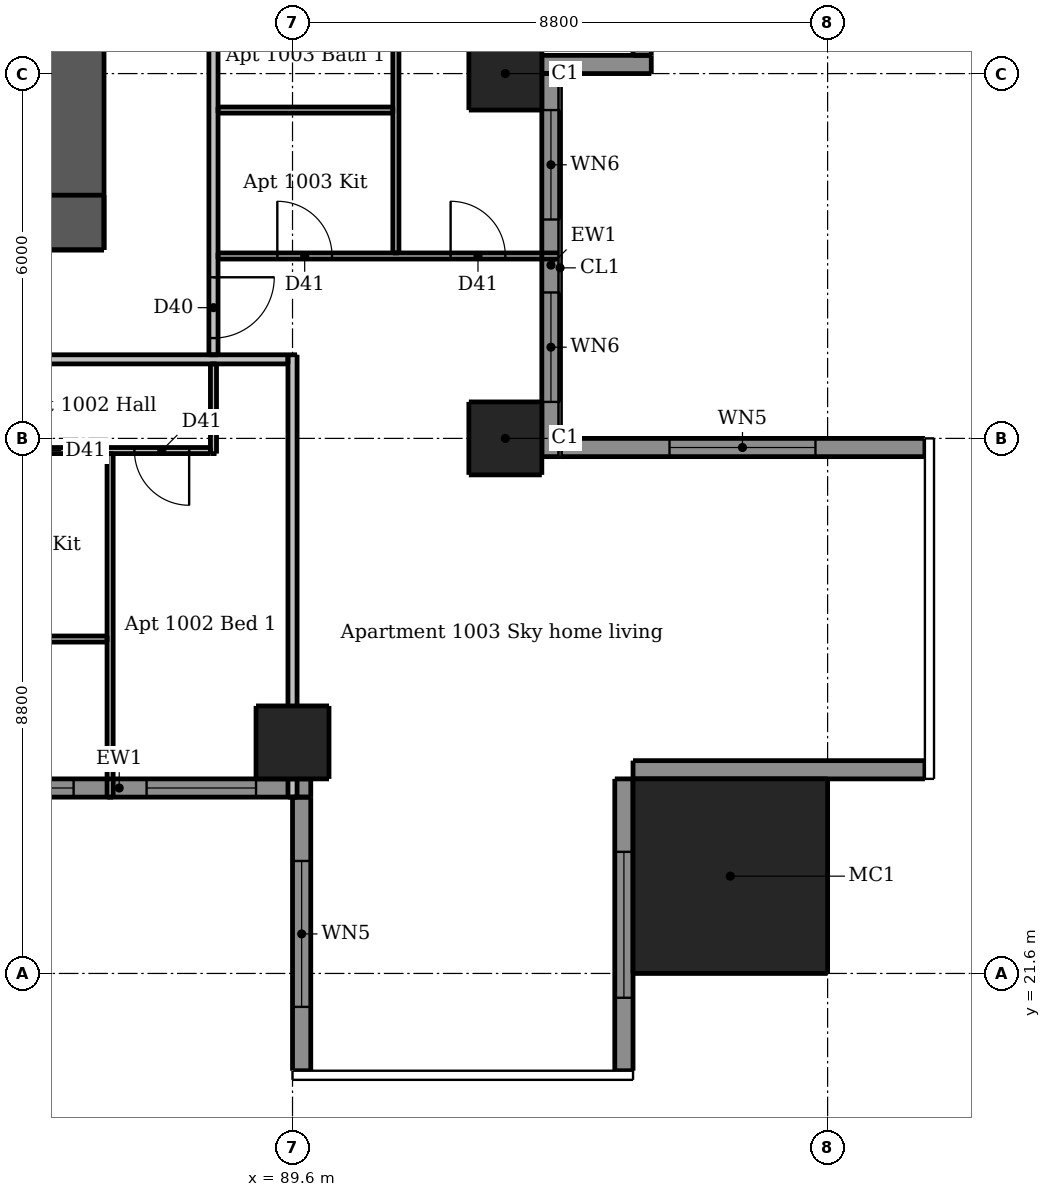
"""IFC4 building model, lengths in metres.
Left out: names, types, materials, properties, quantities, classifications, styles, units other than length and angle.
Written with IfcOpenShell. Run it as: python <this file> out.ifc"""

import sys

from ifc_helpers import new_model, si_unit, direction, frame, frame_2d, origin, origin_2d, place, context, subcontext, project, spatial, rectangle, extrude, element, fill, save


model = new_model("IFC4")
c1 = context("Model", 3, precision=1e-05, world=origin(), true_north=direction((0.0, 1.0)))
c2 = subcontext(c1, "Body", "Model", "MODEL_VIEW")
j1 = project(units=[si_unit("LENGTHUNIT", "METRE"), si_unit("PLANEANGLEUNIT", "RADIAN")], contexts=[c1])
p1 = place(None, origin())
s1 = spatial("IfcSite", under=j1, at=p1, CompositionType="ELEMENT")
p2 = place(p1, origin())
s2 = spatial("IfcBuilding", under=s1, at=p2, CompositionType="ELEMENT")
p3 = place(p2, frame((0.0, 0.0, 40.0)))
s3 = spatial("IfcBuildingStorey", under=s2, at=p3, CompositionType="ELEMENT", Elevation=40.0)
p4 = place(p3, frame((62.5, 33.95, 0.0), z_axis=(0.0, 0.0, 1.0), x_axis=(1.0, 0.0, 0.0)))
e1 = element("IfcWall", 1, at=p4, inside=s3, PredefinedType="SHEAR", context=c2, shape_type="SweptSolid", body=[
    extrude(rectangle(XDim=24.0, YDim=0.9, at=frame_2d((12.0, 0.0))), origin(), (0.0, 0.0, 1.0), 3.05),
])
p5 = place(p4, frame((2.05, 0.0, 0.0)))
e2 = element("IfcOpeningElement", 2, at=p5, cuts=e1, PredefinedType="OPENING", context=c2, shape_type="SweptSolid", body=[
    extrude(rectangle(XDim=1.1, YDim=2.1, at=frame_2d((0.55, 1.05))), frame((0.0, 0.46, 0.0), z_axis=(0.0, -1.0, 0.0), x_axis=(1.0, 0.0, 0.0)), (0.0, 0.0, 1.0), 0.92),
])
p6 = place(p4, frame((20.85, 0.0, 0.0)))
e3 = element("IfcOpeningElement", 3, at=p6, cuts=e1, PredefinedType="OPENING", context=c2, shape_type="SweptSolid", body=[
    extrude(rectangle(XDim=1.1, YDim=2.1, at=frame_2d((0.55, 1.05))), frame((0.0, 0.46, 0.0), z_axis=(0.0, -1.0, 0.0), x_axis=(1.0, 0.0, 0.0)), (0.0, 0.0, 1.0), 0.92),
])
p7 = place(p4, frame((8.0, 0.0, 0.0)))
e4 = element("IfcOpeningElement", 4, at=p7, cuts=e1, PredefinedType="OPENING", context=c2, shape_type="SweptSolid", body=[
    extrude(rectangle(XDim=1.1, YDim=2.1, at=frame_2d((0.55, 1.05))), frame((0.0, 0.46, 0.0), z_axis=(0.0, -1.0, 0.0), x_axis=(1.0, 0.0, 0.0)), (0.0, 0.0, 1.0), 0.92),
])
p8 = place(p4, frame((16.363, 0.0, 0.0)))
e5 = element("IfcOpeningElement", 5, at=p8, cuts=e1, PredefinedType="OPENING", context=c2, shape_type="SweptSolid", body=[
    extrude(rectangle(XDim=0.9, YDim=2.1, at=frame_2d((0.45, 1.05))), frame((0.0, 0.46, 0.0), z_axis=(0.0, -1.0, 0.0), x_axis=(1.0, 0.0, 0.0)), (0.0, 0.0, 1.0), 0.92),
])
p9 = place(p3, frame((86.05, 33.5, 0.0), z_axis=(0.0, 0.0, 1.0), x_axis=(0.0, 1.0, 0.0)))
e6 = element("IfcWall", 6, at=p9, inside=s3, PredefinedType="SHEAR", context=c2, shape_type="SweptSolid", body=[
    extrude(rectangle(XDim=24.0, YDim=0.9, at=frame_2d((12.0, 0.0))), origin(), (0.0, 0.0, 1.0), 3.05),
])
p10 = place(p9, frame((11.2, 0.0, 0.0)))
e7 = element("IfcOpeningElement", 7, at=p10, cuts=e6, PredefinedType="OPENING", context=c2, shape_type="SweptSolid", body=[
    extrude(rectangle(XDim=1.6, YDim=2.1, at=frame_2d((0.8, 1.05))), frame((0.0, 0.46, 0.0), z_axis=(0.0, -1.0, 0.0), x_axis=(1.0, 0.0, 0.0)), (0.0, 0.0, 1.0), 0.92),
])
for number, where, z_axis, x_axis in (
    (8, (89.6, 25.4, 0.0), (0.0, 0.0, 1.0), (1.0, 0.0, 0.0)),
    (9, (93.1, 30.4, 0.0), (0.0, 0.0, 1.0), (1.0, 0.0, 0.0)),
    (10, (93.1, 36.4, 0.0), (0.0, 0.0, 1.0), (1.0, 0.0, 0.0)),
):
    element("IfcColumn", number, at=place(p3, frame(where, z_axis=z_axis, x_axis=x_axis)), inside=s3, PredefinedType="COLUMN", context=c2, shape_type="SweptSolid", body=[
        extrude(rectangle(XDim=1.2, YDim=1.2, at=origin_2d()), origin(), (0.0, 0.0, 1.0), 3.05),
    ])
p11 = place(p3, frame((96.8, 23.2, 0.0), z_axis=(0.0, 0.0, 1.0), x_axis=(1.0, 0.0, 0.0)))
e11 = element("IfcColumn", 11, at=p11, inside=s3, PredefinedType="COLUMN", context=c2, shape_type="SweptSolid", body=[
    extrude(rectangle(XDim=3.2, YDim=3.2, at=origin_2d()), origin(), (0.0, 0.0, 1.0), 3.3),
])
p12 = place(p3, frame((89.75, 24.5, 0.0), z_axis=(0.0, 0.0, 1.0), x_axis=(0.0, -1.0, 0.0)))
e12 = element("IfcWall", 12, at=p12, inside=s3, PredefinedType="SOLIDWALL", context=c2, shape_type="SweptSolid", body=[
    extrude(rectangle(XDim=4.5, YDim=0.3, at=frame_2d((2.25, 0.0))), origin(), (0.0, 0.0, 1.0), 3.05),
])
p13 = place(p12, frame((1.05, 0.0, 0.15)))
e13 = element("IfcOpeningElement", 13, at=p13, cuts=e12, PredefinedType="OPENING", context=c2, shape_type="SweptSolid", body=[
    extrude(rectangle(XDim=2.4, YDim=2.1, at=frame_2d((1.2, 1.05))), frame((0.0, 0.16, 0.0), z_axis=(0.0, -1.0, 0.0), x_axis=(1.0, 0.0, 0.0)), (0.0, 0.0, 1.0), 0.32),
])
p14 = place(p3, frame((95.05, 20.0, 0.0), z_axis=(0.0, 0.0, 1.0), x_axis=(0.0, 1.0, 0.0)))
e14 = element("IfcWall", 14, at=p14, inside=s3, PredefinedType="SOLIDWALL", context=c2, shape_type="SweptSolid", body=[
    extrude(rectangle(XDim=4.8, YDim=0.3, at=frame_2d((2.4, 0.0))), origin(), (0.0, 0.0, 1.0), 3.05),
])
p15 = place(p14, frame((1.2, 0.0, 0.15)))
e15 = element("IfcOpeningElement", 15, at=p15, cuts=e14, PredefinedType="OPENING", context=c2, shape_type="SweptSolid", body=[
    extrude(rectangle(XDim=2.4, YDim=2.1, at=frame_2d((1.2, 1.05))), frame((0.0, 0.16, 0.0), z_axis=(0.0, -1.0, 0.0), x_axis=(1.0, 0.0, 0.0)), (0.0, 0.0, 1.0), 0.32),
])
p16 = place(p3, frame((95.2, 24.95, 0.0), z_axis=(0.0, 0.0, 1.0), x_axis=(1.0, 0.0, 0.0)))
e16 = element("IfcWall", 16, at=p16, inside=s3, PredefinedType="SOLIDWALL", context=c2, shape_type="SweptSolid", body=[
    extrude(rectangle(XDim=4.8, YDim=0.3, at=frame_2d((2.4, 0.0))), origin(), (0.0, 0.0, 1.0), 3.05),
])
p17 = place(p3, frame((100.0, 30.25, 0.0), z_axis=(0.0, 0.0, 1.0), x_axis=(-1.0, 0.0, 0.0)))
e17 = element("IfcWall", 17, at=p17, inside=s3, PredefinedType="SOLIDWALL", context=c2, shape_type="SweptSolid", body=[
    extrude(rectangle(XDim=6.0, YDim=0.3, at=frame_2d((3.0, 0.0))), origin(), (0.0, 0.0, 1.0), 3.05),
])
p18 = place(p17, frame((1.8, 0.0, 0.15)))
e18 = element("IfcOpeningElement", 18, at=p18, cuts=e17, PredefinedType="OPENING", context=c2, shape_type="SweptSolid", body=[
    extrude(rectangle(XDim=2.4, YDim=2.1, at=frame_2d((1.2, 1.05))), frame((0.0, 0.16, 0.0), z_axis=(0.0, -1.0, 0.0), x_axis=(1.0, 0.0, 0.0)), (0.0, 0.0, 1.0), 0.32),
])
p19 = place(p3, frame((93.7, 36.55, 0.0), z_axis=(0.0, 0.0, 1.0), x_axis=(1.0, 0.0, 0.0)))
e19 = element("IfcWall", 19, at=p19, inside=s3, PredefinedType="SOLIDWALL", context=c2, shape_type="SweptSolid", body=[
    extrude(rectangle(XDim=1.8, YDim=0.3, at=frame_2d((0.9, 0.0))), origin(), (0.0, 0.0, 1.0), 3.05),
])
p20 = place(p3, frame((83.6, 24.65, 0.0), z_axis=(0.0, 0.0, 1.0), x_axis=(1.0, 0.0, 0.0)))
e20 = element("IfcWall", 20, at=p20, inside=s3, PredefinedType="SOLIDWALL", context=c2, shape_type="SweptSolid", body=[
    extrude(rectangle(XDim=6.3, YDim=0.3, at=frame_2d((3.15, 0.0))), origin(), (0.0, 0.0, 1.0), 3.05),
])
p21 = place(p20, frame((0.6, 0.0, 0.15)))
e21 = element("IfcOpeningElement", 21, at=p21, cuts=e20, PredefinedType="OPENING", context=c2, shape_type="SweptSolid", body=[
    extrude(rectangle(XDim=1.8, YDim=2.1, at=frame_2d((0.9, 1.05))), frame((0.0, 0.16, 0.0), z_axis=(0.0, -1.0, 0.0), x_axis=(1.0, 0.0, 0.0)), (0.0, 0.0, 1.0), 0.32),
])
p22 = place(p20, frame((3.6, 0.0, 0.15)))
e22 = element("IfcOpeningElement", 22, at=p22, cuts=e20, PredefinedType="OPENING", context=c2, shape_type="SweptSolid", body=[
    extrude(rectangle(XDim=1.8, YDim=2.1, at=frame_2d((0.9, 1.05))), frame((0.0, 0.16, 0.0), z_axis=(0.0, -1.0, 0.0), x_axis=(1.0, 0.0, 0.0)), (0.0, 0.0, 1.0), 0.32),
])
p23 = place(p3, frame((93.85, 30.1, 0.0), z_axis=(0.0, 0.0, 1.0), x_axis=(0.0, 1.0, 0.0)))
e23 = element("IfcWall", 23, at=p23, inside=s3, PredefinedType="SOLIDWALL", context=c2, shape_type="SweptSolid", body=[
    extrude(rectangle(XDim=6.3, YDim=0.3, at=frame_2d((3.15, 0.0))), origin(), (0.0, 0.0, 1.0), 3.05),
])
p24 = place(p23, frame((0.9, 0.0, 0.15)))
e24 = element("IfcOpeningElement", 24, at=p24, cuts=e23, PredefinedType="OPENING", context=c2, shape_type="SweptSolid", body=[
    extrude(rectangle(XDim=1.8, YDim=2.1, at=frame_2d((0.9, 1.05))), frame((0.0, 0.16, 0.0), z_axis=(0.0, -1.0, 0.0), x_axis=(1.0, 0.0, 0.0)), (0.0, 0.0, 1.0), 0.32),
])
p25 = place(p23, frame((3.9, 0.0, 0.15)))
e25 = element("IfcOpeningElement", 25, at=p25, cuts=e23, PredefinedType="OPENING", context=c2, shape_type="SweptSolid", body=[
    extrude(rectangle(XDim=1.8, YDim=2.1, at=frame_2d((0.9, 1.05))), frame((0.0, 0.16, 0.0), z_axis=(0.0, -1.0, 0.0), x_axis=(1.0, 0.0, 0.0)), (0.0, 0.0, 1.0), 0.32),
])
p26 = place(p3, frame((95.35, 36.7, 0.0), z_axis=(0.0, 0.0, 1.0), x_axis=(0.0, 1.0, 0.0)))
e26 = element("IfcWall", 26, at=p26, inside=s3, PredefinedType="SOLIDWALL", context=c2, shape_type="SweptSolid", body=[
    extrude(rectangle(XDim=5.61, YDim=0.3, at=frame_2d((2.805, 0.0))), origin(), (0.0, 0.0, 1.0), 3.05),
])
p27 = place(p26, frame((0.3, 0.0, 0.15)))
e27 = element("IfcOpeningElement", 27, at=p27, cuts=e26, PredefinedType="OPENING", context=c2, shape_type="SweptSolid", body=[
    extrude(rectangle(XDim=1.8, YDim=2.1, at=frame_2d((0.9, 1.05))), frame((0.0, 0.16, 0.0), z_axis=(0.0, -1.0, 0.0), x_axis=(1.0, 0.0, 0.0)), (0.0, 0.0, 1.0), 0.32),
])
p28 = place(p26, frame((3.3, 0.0, 0.15)))
e28 = element("IfcOpeningElement", 28, at=p28, cuts=e26, PredefinedType="OPENING", context=c2, shape_type="SweptSolid", body=[
    extrude(rectangle(XDim=1.8, YDim=2.1, at=frame_2d((0.9, 1.05))), frame((0.0, 0.16, 0.0), z_axis=(0.0, -1.0, 0.0), x_axis=(1.0, 0.0, 0.0)), (0.0, 0.0, 1.0), 0.32),
])
p29 = place(p3, frame((86.6, 24.5, 0.0), z_axis=(0.0, 0.0, 1.0), x_axis=(0.0, 1.0, 0.0)))
e29 = element("IfcWall", 29, at=p29, inside=s3, PredefinedType="PARTITIONING", context=c2, shape_type="SweptSolid", body=[
    extrude(rectangle(XDim=5.65, YDim=0.1, at=frame_2d((2.825, 0.0))), origin(), (0.0, 0.0, 1.0), 3.05),
])
p30 = place(p3, frame((88.3, 30.15, 0.0), z_axis=(0.0, 0.0, 1.0), x_axis=(0.0, 1.0, 0.0)))
e30 = element("IfcWall", 30, at=p30, inside=s3, PredefinedType="PARTITIONING", context=c2, shape_type="SweptSolid", body=[
    extrude(rectangle(XDim=1.475, YDim=0.1, at=frame_2d((0.738, 0.0))), origin(), (0.0, 0.0, 1.0), 3.05),
])
p31 = place(p3, frame((91.3, 33.45, 0.0), z_axis=(0.0, 0.0, 1.0), x_axis=(0.0, 1.0, 0.0)))
e31 = element("IfcWall", 31, at=p31, inside=s3, PredefinedType="PARTITIONING", context=c2, shape_type="SweptSolid", body=[
    extrude(rectangle(XDim=5.875, YDim=0.1, at=frame_2d((2.938, 0.0))), origin(), (0.0, 0.0, 1.0), 3.05),
])
p32 = place(p31, frame((3.75, 0.0, 0.0)))
e32 = element("IfcOpeningElement", 32, at=p32, cuts=e31, PredefinedType="OPENING", context=c2, shape_type="SweptSolid", body=[
    extrude(rectangle(XDim=0.8, YDim=2.1, at=frame_2d((0.4, 1.05))), frame((0.0, 0.06, 0.0), z_axis=(0.0, -1.0, 0.0), x_axis=(1.0, 0.0, 0.0)), (0.0, 0.0, 1.0), 0.12),
])
p33 = place(p3, frame((88.375, 35.8, 0.0), z_axis=(0.0, 0.0, 1.0), x_axis=(1.0, 0.0, 0.0)))
e33 = element("IfcWall", 33, at=p33, inside=s3, PredefinedType="PARTITIONING", context=c2, shape_type="SweptSolid", body=[
    extrude(rectangle(XDim=2.875, YDim=0.1, at=frame_2d((1.438, 0.0))), origin(), (0.0, 0.0, 1.0), 3.05),
])
p34 = place(p3, frame((88.375, 33.4, 0.0), z_axis=(0.0, 0.0, 1.0), x_axis=(1.0, 0.0, 0.0)))
e34 = element("IfcWall", 34, at=p34, inside=s3, PredefinedType="PARTITIONING", context=c2, shape_type="SweptSolid", body=[
    extrude(rectangle(XDim=5.625, YDim=0.1, at=frame_2d((2.812, 0.0))), origin(), (0.0, 0.0, 1.0), 3.05),
])
p35 = place(p34, frame((0.975, 0.0, 0.0)))
e35 = element("IfcOpeningElement", 35, at=p35, cuts=e34, PredefinedType="OPENING", context=c2, shape_type="SweptSolid", body=[
    extrude(rectangle(XDim=0.9, YDim=2.1, at=frame_2d((0.45, 1.05))), frame((0.0, 0.06, 0.0), z_axis=(0.0, -1.0, 0.0), x_axis=(1.0, 0.0, 0.0)), (0.0, 0.0, 1.0), 0.12),
])
p36 = place(p34, frame((3.825, 0.0, 0.0)))
e36 = element("IfcOpeningElement", 36, at=p36, cuts=e34, PredefinedType="OPENING", context=c2, shape_type="SweptSolid", body=[
    extrude(rectangle(XDim=0.9, YDim=2.1, at=frame_2d((0.45, 1.05))), frame((0.0, 0.06, 0.0), z_axis=(0.0, -1.0, 0.0), x_axis=(1.0, 0.0, 0.0)), (0.0, 0.0, 1.0), 0.12),
])
p37 = place(p3, frame((88.25, 30.2, 0.0), z_axis=(0.0, 0.0, 1.0), x_axis=(-1.0, 0.0, 0.0)))
e37 = element("IfcWall", 37, at=p37, inside=s3, PredefinedType="PARTITIONING", context=c2, shape_type="SweptSolid", body=[
    extrude(rectangle(XDim=13.575, YDim=0.1, at=frame_2d((6.788, 0.0))), origin(), (0.0, 0.0, 1.0), 3.05),
])
p38 = place(p37, frame((7.5, 0.0, 0.0)))
e38 = element("IfcOpeningElement", 38, at=p38, cuts=e37, PredefinedType="OPENING", context=c2, shape_type="SweptSolid", body=[
    extrude(rectangle(XDim=0.9, YDim=2.1, at=frame_2d((0.45, 1.05))), frame((0.0, 0.06, 0.0), z_axis=(0.0, -1.0, 0.0), x_axis=(1.0, 0.0, 0.0)), (0.0, 0.0, 1.0), 0.12),
])
p39 = place(p37, frame((2.7, 0.0, 0.0)))
e39 = element("IfcOpeningElement", 39, at=p39, cuts=e37, PredefinedType="OPENING", context=c2, shape_type="SweptSolid", body=[
    extrude(rectangle(XDim=0.9, YDim=2.1, at=frame_2d((0.45, 1.05))), frame((0.0, 0.06, 0.0), z_axis=(0.0, -1.0, 0.0), x_axis=(1.0, 0.0, 0.0)), (0.0, 0.0, 1.0), 0.12),
])
p40 = place(p37, frame((0.35, 0.0, 0.0)))
e40 = element("IfcOpeningElement", 40, at=p40, cuts=e37, PredefinedType="OPENING", context=c2, shape_type="SweptSolid", body=[
    extrude(rectangle(XDim=0.9, YDim=2.1, at=frame_2d((0.45, 1.05))), frame((0.0, 0.06, 0.0), z_axis=(0.0, -1.0, 0.0), x_axis=(1.0, 0.0, 0.0)), (0.0, 0.0, 1.0), 0.12),
])
p41 = place(p37, frame((12.05, 0.0, 0.0)))
e41 = element("IfcOpeningElement", 41, at=p41, cuts=e37, PredefinedType="OPENING", context=c2, shape_type="SweptSolid", body=[
    extrude(rectangle(XDim=0.8, YDim=2.1, at=frame_2d((0.4, 1.05))), frame((0.0, 0.06, 0.0), z_axis=(0.0, -1.0, 0.0), x_axis=(1.0, 0.0, 0.0)), (0.0, 0.0, 1.0), 0.12),
])
p42 = place(p3, frame((83.65, 27.1, 0.0), z_axis=(0.0, 0.0, 1.0), x_axis=(1.0, 0.0, 0.0)))
e42 = element("IfcWall", 42, at=p42, inside=s3, PredefinedType="PARTITIONING", context=c2, shape_type="SweptSolid", body=[
    extrude(rectangle(XDim=2.9, YDim=0.1, at=frame_2d((1.45, 0.0))), origin(), (0.0, 0.0, 1.0), 3.05),
])
p43 = place(p3, frame((88.3, 60.475, 0.0), z_axis=(0.0, 0.0, 1.0), x_axis=(0.0, -1.0, 0.0)))
e43 = element("IfcWall", 43, at=p43, inside=s3, PredefinedType="PARTITIONING", context=c2, shape_type="SweptSolid", body=[
    extrude(rectangle(XDim=28.7, YDim=0.15, at=frame_2d((14.35, 0.0))), origin(), (0.0, 0.0, 1.0), 3.05),
])
p44 = place(p43, frame((27.425, 0.0, 0.0)))
e44 = element("IfcOpeningElement", 44, at=p44, cuts=e43, PredefinedType="OPENING", context=c2, shape_type="SweptSolid", body=[
    extrude(rectangle(XDim=1.0, YDim=2.1, at=frame_2d((0.5, 1.05))), frame((0.0, 0.085, 0.0), z_axis=(0.0, -1.0, 0.0), x_axis=(1.0, 0.0, 0.0)), (0.0, 0.0, 1.0), 0.17),
])
p45 = place(p43, frame((10.625, 0.0, 0.0)))
e45 = element("IfcOpeningElement", 45, at=p45, cuts=e43, PredefinedType="OPENING", context=c2, shape_type="SweptSolid", body=[
    extrude(rectangle(XDim=1.0, YDim=2.1, at=frame_2d((0.5, 1.05))), frame((0.0, 0.085, 0.0), z_axis=(0.0, -1.0, 0.0), x_axis=(1.0, 0.0, 0.0)), (0.0, 0.0, 1.0), 0.17),
])
p46 = place(p3, frame((89.6, 24.5, 0.0), z_axis=(0.0, 0.0, 1.0), x_axis=(0.0, 1.0, 0.0)))
e46 = element("IfcWall", 46, at=p46, inside=s3, PredefinedType="PARTITIONING", context=c2, shape_type="SweptSolid", body=[
    extrude(rectangle(XDim=7.275, YDim=0.15, at=frame_2d((3.637, 0.0))), origin(), (0.0, 0.0, 1.0), 2.516),
])
p47 = place(p3, frame((89.525, 31.7, 0.0), z_axis=(0.0, 0.0, 1.0), x_axis=(-1.0, 0.0, 0.0)))
e47 = element("IfcWall", 47, at=p47, inside=s3, PredefinedType="PARTITIONING", context=c2, shape_type="SweptSolid", body=[
    extrude(rectangle(XDim=28.75, YDim=0.15, at=frame_2d((14.375, 0.0))), origin(), (0.0, 0.0, 1.0), 3.05),
])
p48 = place(p47, frame((24.475, 0.0, 0.0)))
e48 = element("IfcOpeningElement", 48, at=p48, cuts=e47, PredefinedType="OPENING", context=c2, shape_type="SweptSolid", body=[
    extrude(rectangle(XDim=1.0, YDim=2.1, at=frame_2d((0.5, 1.05))), frame((0.0, 0.085, 0.0), z_axis=(0.0, -1.0, 0.0), x_axis=(1.0, 0.0, 0.0)), (0.0, 0.0, 1.0), 0.17),
])
p49 = place(p47, frame((7.575, 0.0, 0.0)))
e49 = element("IfcOpeningElement", 49, at=p49, cuts=e47, PredefinedType="OPENING", context=c2, shape_type="SweptSolid", body=[
    extrude(rectangle(XDim=1.0, YDim=2.1, at=frame_2d((0.5, 1.05))), frame((0.0, 0.085, 0.0), z_axis=(0.0, -1.0, 0.0), x_axis=(1.0, 0.0, 0.0)), (0.0, 0.0, 1.0), 0.17),
])
p50 = place(p13, origin())
e50 = element("IfcWindow", 50, at=p50, inside=s3, PartitioningType="DOUBLE_PANEL_VERTICAL", PredefinedType="WINDOW", context=c2, shape_type="SweptSolid", body=[
    extrude(rectangle(XDim=2.4, YDim=2.1, at=frame_2d((1.2, 1.05))), frame((0.0, 0.03, 0.0), z_axis=(0.0, -1.0, 0.0), x_axis=(1.0, 0.0, 0.0)), (0.0, 0.0, 1.0), 0.06),
])
fill(e13, e50)
p51 = place(p15, origin())
e51 = element("IfcWindow", 51, at=p51, inside=s3, PartitioningType="DOUBLE_PANEL_VERTICAL", PredefinedType="WINDOW", context=c2, shape_type="SweptSolid", body=[
    extrude(rectangle(XDim=2.4, YDim=2.1, at=frame_2d((1.2, 1.05))), frame((0.0, 0.03, 0.0), z_axis=(0.0, -1.0, 0.0), x_axis=(1.0, 0.0, 0.0)), (0.0, 0.0, 1.0), 0.06),
])
fill(e15, e51)
p52 = place(p18, origin())
e52 = element("IfcWindow", 52, at=p52, inside=s3, PartitioningType="DOUBLE_PANEL_VERTICAL", PredefinedType="WINDOW", context=c2, shape_type="SweptSolid", body=[
    extrude(rectangle(XDim=2.4, YDim=2.1, at=frame_2d((1.2, 1.05))), frame((0.0, 0.03, 0.0), z_axis=(0.0, -1.0, 0.0), x_axis=(1.0, 0.0, 0.0)), (0.0, 0.0, 1.0), 0.06),
])
fill(e18, e52)
p53 = place(p21, origin())
e53 = element("IfcWindow", 53, at=p53, inside=s3, PartitioningType="DOUBLE_PANEL_VERTICAL", PredefinedType="WINDOW", context=c2, shape_type="SweptSolid", body=[
    extrude(rectangle(XDim=1.8, YDim=2.1, at=frame_2d((0.9, 1.05))), frame((0.0, 0.03, 0.0), z_axis=(0.0, -1.0, 0.0), x_axis=(1.0, 0.0, 0.0)), (0.0, 0.0, 1.0), 0.06),
])
fill(e21, e53)
p54 = place(p22, origin())
e54 = element("IfcWindow", 54, at=p54, inside=s3, PartitioningType="DOUBLE_PANEL_VERTICAL", PredefinedType="WINDOW", context=c2, shape_type="SweptSolid", body=[
    extrude(rectangle(XDim=1.8, YDim=2.1, at=frame_2d((0.9, 1.05))), frame((0.0, 0.03, 0.0), z_axis=(0.0, -1.0, 0.0), x_axis=(1.0, 0.0, 0.0)), (0.0, 0.0, 1.0), 0.06),
])
fill(e22, e54)
p55 = place(p24, origin())
e55 = element("IfcWindow", 55, at=p55, inside=s3, PartitioningType="DOUBLE_PANEL_VERTICAL", PredefinedType="WINDOW", context=c2, shape_type="SweptSolid", body=[
    extrude(rectangle(XDim=1.8, YDim=2.1, at=frame_2d((0.9, 1.05))), frame((0.0, 0.03, 0.0), z_axis=(0.0, -1.0, 0.0), x_axis=(1.0, 0.0, 0.0)), (0.0, 0.0, 1.0), 0.06),
])
fill(e24, e55)
p56 = place(p25, origin())
e56 = element("IfcWindow", 56, at=p56, inside=s3, PartitioningType="DOUBLE_PANEL_VERTICAL", PredefinedType="WINDOW", context=c2, shape_type="SweptSolid", body=[
    extrude(rectangle(XDim=1.8, YDim=2.1, at=frame_2d((0.9, 1.05))), frame((0.0, 0.03, 0.0), z_axis=(0.0, -1.0, 0.0), x_axis=(1.0, 0.0, 0.0)), (0.0, 0.0, 1.0), 0.06),
])
fill(e25, e56)
p57 = place(p40, origin())
e57 = element("IfcDoor", 57, at=p57, inside=s3, OperationType="SINGLE_SWING_LEFT", PredefinedType="DOOR", context=c2, shape_type="SweptSolid", body=[
    extrude(rectangle(XDim=0.9, YDim=2.1, at=frame_2d((0.45, 1.05))), frame((0.0, 0.025, 0.0), z_axis=(0.0, -1.0, 0.0), x_axis=(1.0, 0.0, 0.0)), (0.0, 0.0, 1.0), 0.05),
])
fill(e40, e57)
p58 = place(p44, origin())
e58 = element("IfcDoor", 58, at=p58, inside=s3, OperationType="SINGLE_SWING_LEFT", PredefinedType="DOOR", context=c2, shape_type="SweptSolid", body=[
    extrude(rectangle(XDim=1.0, YDim=2.1, at=frame_2d((0.5, 1.05))), frame((0.0, 0.025, 0.0), z_axis=(0.0, -1.0, 0.0), x_axis=(1.0, 0.0, 0.0)), (0.0, 0.0, 1.0), 0.05),
])
fill(e44, e58)
p59 = place(p35, origin())
e59 = element("IfcDoor", 59, at=p59, inside=s3, OperationType="SINGLE_SWING_LEFT", PredefinedType="DOOR", context=c2, shape_type="SweptSolid", body=[
    extrude(rectangle(XDim=0.9, YDim=2.1, at=frame_2d((0.45, 1.05))), frame((0.0, 0.025, 0.0), z_axis=(0.0, -1.0, 0.0), x_axis=(1.0, 0.0, 0.0)), (0.0, 0.0, 1.0), 0.05),
])
fill(e35, e59)
p60 = place(p36, origin())
e60 = element("IfcDoor", 60, at=p60, inside=s3, OperationType="SINGLE_SWING_LEFT", PredefinedType="DOOR", context=c2, shape_type="SweptSolid", body=[
    extrude(rectangle(XDim=0.9, YDim=2.1, at=frame_2d((0.45, 1.05))), frame((0.0, 0.025, 0.0), z_axis=(0.0, -1.0, 0.0), x_axis=(1.0, 0.0, 0.0)), (0.0, 0.0, 1.0), 0.05),
])
fill(e36, e60)
save(model, sys.argv[1])
